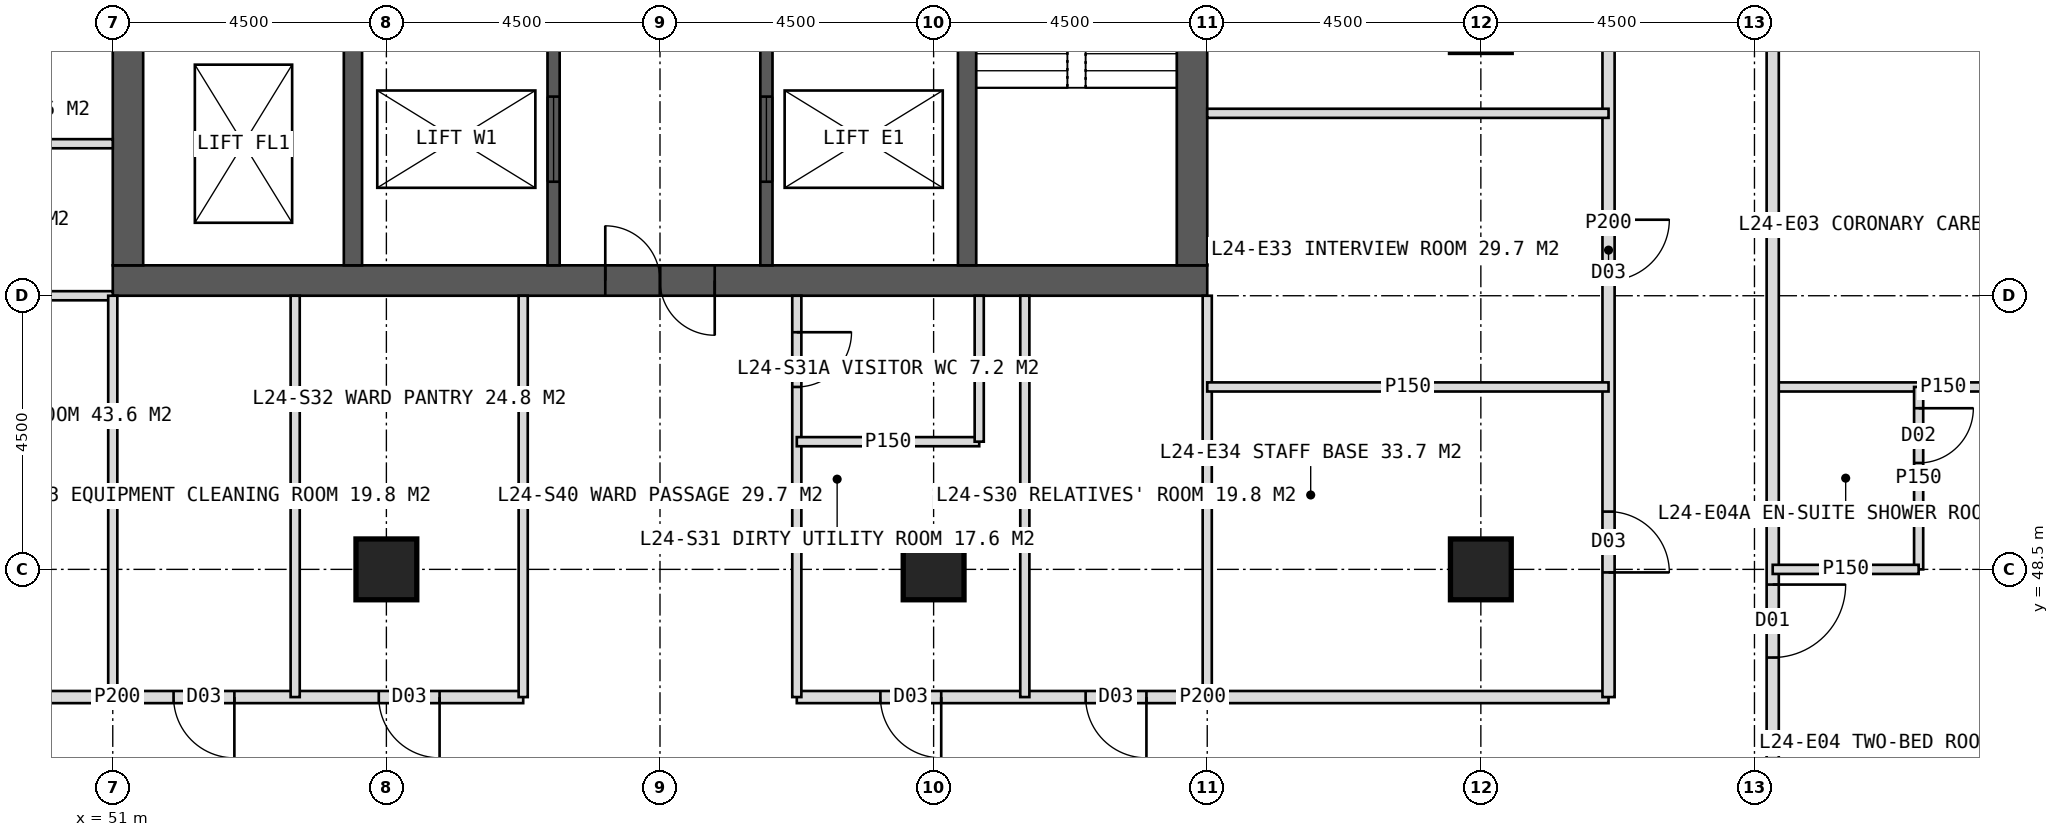
"""IFC4 building model, lengths in metres.
Left out: names, types, materials, properties, quantities, classifications, styles, units other than length and angle.
Written with IfcOpenShell. Run it as: python <this file> out.ifc"""

import sys

from ifc_helpers import new_model, si_unit, direction, frame, frame_2d, origin, origin_2d, place, context, subcontext, project, spatial, rectangle, hollow_rectangle, extrude, element, fill, save


model = new_model("IFC4")
c1 = context("Model", 3, precision=1e-05, world=origin(), true_north=direction((0.0, 1.0)))
c2 = subcontext(c1, "Body", "Model", "MODEL_VIEW")
j1 = project(units=[si_unit("LENGTHUNIT", "METRE"), si_unit("PLANEANGLEUNIT", "RADIAN")], contexts=[c1])
p1 = place(None, origin())
s1 = spatial("IfcSite", under=j1, at=p1, CompositionType="ELEMENT")
p2 = place(p1, origin())
s2 = spatial("IfcBuilding", under=s1, at=p2, CompositionType="ELEMENT")
p3 = place(p2, frame((0.0, 0.0, 104.0)))
s3 = spatial("IfcBuildingStorey", under=s2, at=p3, CompositionType="ELEMENT", Elevation=104.0)
p4 = place(p3, frame((51.0, 53.25, 0.0), z_axis=(0.0, 0.0, 1.0), x_axis=(1.0, 0.0, 0.0)))
e1 = element("IfcWall", 1, at=p4, inside=s3, PredefinedType="SHEAR", context=c2, shape_type="SweptSolid", body=[
    extrude(rectangle(XDim=18.0, YDim=0.5, at=frame_2d((9.0, 0.0))), origin(), (0.0, 0.0, 1.0), 4.0),
])
p5 = place(p4, frame((8.1, 0.0, 0.0)))
e2 = element("IfcOpeningElement", 2, at=p5, cuts=e1, PredefinedType="OPENING", context=c2, shape_type="SweptSolid", body=[
    extrude(rectangle(XDim=1.8, YDim=2.2, at=frame_2d((0.9, 1.1))), frame((0.0, 0.26, 0.0), z_axis=(0.0, -1.0, 0.0), x_axis=(1.0, 0.0, 0.0)), (0.0, 0.0, 1.0), 0.52),
])
p6 = place(p3, frame((51.25, 53.5, 0.0), z_axis=(0.0, 0.0, 1.0), x_axis=(0.0, 1.0, 0.0)))
e3 = element("IfcWall", 3, at=p6, inside=s3, PredefinedType="SHEAR", context=c2, shape_type="SweptSolid", body=[
    extrude(rectangle(XDim=17.0, YDim=0.5, at=frame_2d((8.5, 0.0))), origin(), (0.0, 0.0, 1.0), 4.0),
])
p7 = place(p6, frame((6.0, 0.0, 0.0)))
e4 = element("IfcOpeningElement", 4, at=p7, cuts=e3, PredefinedType="OPENING", context=c2, shape_type="SweptSolid", body=[
    extrude(rectangle(XDim=1.5, YDim=2.2, at=frame_2d((0.75, 1.1))), frame((0.0, 0.26, 0.0), z_axis=(0.0, -1.0, 0.0), x_axis=(1.0, 0.0, 0.0)), (0.0, 0.0, 1.0), 0.52),
])
p8 = place(p3, frame((68.75, 53.5, 0.0), z_axis=(0.0, 0.0, 1.0), x_axis=(0.0, 1.0, 0.0)))
e5 = element("IfcWall", 5, at=p8, inside=s3, PredefinedType="SHEAR", context=c2, shape_type="SweptSolid", body=[
    extrude(rectangle(XDim=17.0, YDim=0.5, at=frame_2d((8.5, 0.0))), origin(), (0.0, 0.0, 1.0), 4.0),
])
p9 = place(p8, frame((9.5, 0.0, 0.0)))
e6 = element("IfcOpeningElement", 6, at=p9, cuts=e5, PredefinedType="OPENING", context=c2, shape_type="SweptSolid", body=[
    extrude(rectangle(XDim=1.5, YDim=2.2, at=frame_2d((0.75, 1.1))), frame((0.0, 0.26, 0.0), z_axis=(0.0, -1.0, 0.0), x_axis=(1.0, 0.0, 0.0)), (0.0, 0.0, 1.0), 0.52),
])
for number, where, z_axis, x_axis in (
    (7, (54.95, 53.5, 0.0), (0.0, 0.0, 1.0), (0.0, 1.0, 0.0)),
    (8, (65.05, 53.5, 0.0), (0.0, 0.0, 1.0), (0.0, 1.0, 0.0)),
):
    element("IfcWall", number, at=place(p3, frame(where, z_axis=z_axis, x_axis=x_axis)), inside=s3, PredefinedType="SHEAR", context=c2, shape_type="SweptSolid", body=[
        extrude(rectangle(XDim=17.0, YDim=0.3, at=frame_2d((8.5, 0.0))), origin(), (0.0, 0.0, 1.0), 4.0),
    ])
p10 = place(p3, frame((58.25, 53.5, 0.0), z_axis=(0.0, 0.0, 1.0), x_axis=(0.0, 1.0, 0.0)))
e9 = element("IfcWall", 9, at=p10, inside=s3, PredefinedType="SHEAR", context=c2, shape_type="SweptSolid", body=[
    extrude(rectangle(XDim=17.0, YDim=0.2, at=frame_2d((8.5, 0.0))), origin(), (0.0, 0.0, 1.0), 4.0),
])
p11 = place(p10, frame((1.375, 0.0, 0.0)))
e10 = element("IfcOpeningElement", 10, at=p11, cuts=e9, PredefinedType="OPENING", context=c2, shape_type="SweptSolid", body=[
    extrude(rectangle(XDim=1.4, YDim=2.2, at=frame_2d((0.7, 1.1))), frame((0.0, 0.11, 0.0), z_axis=(0.0, -1.0, 0.0), x_axis=(1.0, 0.0, 0.0)), (0.0, 0.0, 1.0), 0.22),
])
p12 = place(p10, frame((5.675, 0.0, 0.0)))
e11 = element("IfcOpeningElement", 11, at=p12, cuts=e9, PredefinedType="OPENING", context=c2, shape_type="SweptSolid", body=[
    extrude(rectangle(XDim=1.4, YDim=2.2, at=frame_2d((0.7, 1.1))), frame((0.0, 0.11, 0.0), z_axis=(0.0, -1.0, 0.0), x_axis=(1.0, 0.0, 0.0)), (0.0, 0.0, 1.0), 0.22),
])
p13 = place(p3, frame((61.75, 53.5, 0.0), z_axis=(0.0, 0.0, 1.0), x_axis=(0.0, 1.0, 0.0)))
e12 = element("IfcWall", 12, at=p13, inside=s3, PredefinedType="SHEAR", context=c2, shape_type="SweptSolid", body=[
    extrude(rectangle(XDim=17.0, YDim=0.2, at=frame_2d((8.5, 0.0))), origin(), (0.0, 0.0, 1.0), 4.0),
])
p14 = place(p13, frame((1.375, 0.0, 0.0)))
e13 = element("IfcOpeningElement", 13, at=p14, cuts=e12, PredefinedType="OPENING", context=c2, shape_type="SweptSolid", body=[
    extrude(rectangle(XDim=1.4, YDim=2.2, at=frame_2d((0.7, 1.1))), frame((0.0, 0.11, 0.0), z_axis=(0.0, -1.0, 0.0), x_axis=(1.0, 0.0, 0.0)), (0.0, 0.0, 1.0), 0.22),
])
p15 = place(p13, frame((5.675, 0.0, 0.0)))
e14 = element("IfcOpeningElement", 14, at=p15, cuts=e12, PredefinedType="OPENING", context=c2, shape_type="SweptSolid", body=[
    extrude(rectangle(XDim=1.4, YDim=2.2, at=frame_2d((0.7, 1.1))), frame((0.0, 0.11, 0.0), z_axis=(0.0, -1.0, 0.0), x_axis=(1.0, 0.0, 0.0)), (0.0, 0.0, 1.0), 0.22),
])
for number, where, z_axis, x_axis in (
    (15, (73.5, 48.5, 0.0), (0.0, 0.0, 1.0), (1.0, 0.0, 0.0)),
    (16, (55.5, 48.5, 0.0), (0.0, 0.0, 1.0), (1.0, 0.0, 0.0)),
    (17, (64.5, 48.5, 0.0), (0.0, 0.0, 1.0), (1.0, 0.0, 0.0)),
):
    element("IfcColumn", number, at=place(p3, frame(where, z_axis=z_axis, x_axis=x_axis)), inside=s3, PredefinedType="COLUMN", context=c2, shape_type="SweptSolid", body=[
        extrude(hollow_rectangle(XDim=1.0, YDim=1.0, WallThickness=0.1, at=origin_2d()), origin(), (0.0, 0.0, 1.0), 4.0),
    ])
for number, where, z_axis, x_axis in (
    (18, (51.0, 53.0, 0.0), (0.0, 0.0, 1.0), (-1.0, 0.0, 0.0)),
    (19, (51.0, 55.5, 0.0), (0.0, 0.0, 1.0), (-1.0, 0.0, 0.0)),
    (20, (69.0, 53.0, 0.0), (0.0, 0.0, 1.0), (0.0, -1.0, 0.0)),
):
    element("IfcWall", number, at=place(p3, frame(where, z_axis=z_axis, x_axis=x_axis)), inside=s3, PredefinedType="PARTITIONING", context=c2, shape_type="SweptSolid", body=[
        extrude(rectangle(XDim=6.6, YDim=0.15, at=frame_2d((3.3, 0.0))), origin(), (0.0, 0.0, 1.0), 3.75),
    ])
p16 = place(p3, frame((75.6, 46.4, 0.0), z_axis=(0.0, 0.0, 1.0), x_axis=(-1.0, 0.0, 0.0)))
e21 = element("IfcWall", 21, at=p16, inside=s3, PredefinedType="PARTITIONING", context=c2, shape_type="SweptSolid", body=[
    extrude(rectangle(XDim=13.35, YDim=0.2, at=frame_2d((6.675, 0.0))), origin(), (0.0, 0.0, 1.0), 3.75),
])
p17 = place(p16, frame((7.6, 0.0, 0.0)))
e22 = element("IfcOpeningElement", 22, at=p17, cuts=e21, PredefinedType="OPENING", context=c2, shape_type="SweptSolid", body=[
    extrude(rectangle(XDim=1.0, YDim=2.1, at=frame_2d((0.5, 1.05))), frame((0.0, 0.11, 0.0), z_axis=(0.0, -1.0, 0.0), x_axis=(1.0, 0.0, 0.0)), (0.0, 0.0, 1.0), 0.22),
])
p18 = place(p16, frame((10.975, 0.0, 0.0)))
e23 = element("IfcOpeningElement", 23, at=p18, cuts=e21, PredefinedType="OPENING", context=c2, shape_type="SweptSolid", body=[
    extrude(rectangle(XDim=1.0, YDim=2.1, at=frame_2d((0.5, 1.05))), frame((0.0, 0.11, 0.0), z_axis=(0.0, -1.0, 0.0), x_axis=(1.0, 0.0, 0.0)), (0.0, 0.0, 1.0), 0.22),
])
p19 = place(p3, frame((57.75, 46.4, 0.0), z_axis=(0.0, 0.0, 1.0), x_axis=(-1.0, 0.0, 0.0)))
e24 = element("IfcWall", 24, at=p19, inside=s3, PredefinedType="PARTITIONING", context=c2, shape_type="SweptSolid", body=[
    extrude(rectangle(XDim=13.35, YDim=0.2, at=frame_2d((6.675, 0.0))), origin(), (0.0, 0.0, 1.0), 3.75),
])
p20 = place(p19, frame((1.375, 0.0, 0.0)))
e25 = element("IfcOpeningElement", 25, at=p20, cuts=e24, PredefinedType="OPENING", context=c2, shape_type="SweptSolid", body=[
    extrude(rectangle(XDim=1.0, YDim=2.1, at=frame_2d((0.5, 1.05))), frame((0.0, 0.11, 0.0), z_axis=(0.0, -1.0, 0.0), x_axis=(1.0, 0.0, 0.0)), (0.0, 0.0, 1.0), 0.22),
])
p21 = place(p19, frame((4.75, 0.0, 0.0)))
e26 = element("IfcOpeningElement", 26, at=p21, cuts=e24, PredefinedType="OPENING", context=c2, shape_type="SweptSolid", body=[
    extrude(rectangle(XDim=1.0, YDim=2.1, at=frame_2d((0.5, 1.05))), frame((0.0, 0.11, 0.0), z_axis=(0.0, -1.0, 0.0), x_axis=(1.0, 0.0, 0.0)), (0.0, 0.0, 1.0), 0.22),
])
p22 = place(p19, frame((9.55, 0.0, 0.0)))
e27 = element("IfcOpeningElement", 27, at=p22, cuts=e24, PredefinedType="OPENING", context=c2, shape_type="SweptSolid", body=[
    extrude(rectangle(XDim=1.0, YDim=2.1, at=frame_2d((0.5, 1.05))), frame((0.0, 0.11, 0.0), z_axis=(0.0, -1.0, 0.0), x_axis=(1.0, 0.0, 0.0)), (0.0, 0.0, 1.0), 0.22),
])
p23 = place(p3, frame((62.25, 53.0, 0.0), z_axis=(0.0, 0.0, 1.0), x_axis=(0.0, -1.0, 0.0)))
e28 = element("IfcWall", 28, at=p23, inside=s3, PredefinedType="PARTITIONING", context=c2, shape_type="SweptSolid", body=[
    extrude(rectangle(XDim=6.6, YDim=0.15, at=frame_2d((3.3, 0.0))), origin(), (0.0, 0.0, 1.0), 3.75),
])
p24 = place(p23, frame((0.6, 0.0, 0.0)))
e29 = element("IfcOpeningElement", 29, at=p24, cuts=e28, PredefinedType="OPENING", context=c2, shape_type="SweptSolid", body=[
    extrude(rectangle(XDim=0.9, YDim=2.1, at=frame_2d((0.45, 1.05))), frame((0.0, 0.085, 0.0), z_axis=(0.0, -1.0, 0.0), x_axis=(1.0, 0.0, 0.0)), (0.0, 0.0, 1.0), 0.17),
])
for number, where, z_axis, x_axis in (
    (30, (57.75, 53.0, 0.0), (0.0, 0.0, 1.0), (0.0, -1.0, 0.0)),
    (31, (66.0, 53.0, 0.0), (0.0, 0.0, 1.0), (0.0, -1.0, 0.0)),
    (32, (54.0, 53.0, 0.0), (0.0, 0.0, 1.0), (0.0, -1.0, 0.0)),
    (33, (51.0, 53.0, 0.0), (0.0, 0.0, 1.0), (0.0, -1.0, 0.0)),
):
    element("IfcWall", number, at=place(p3, frame(where, z_axis=z_axis, x_axis=x_axis)), inside=s3, PredefinedType="PARTITIONING", context=c2, shape_type="SweptSolid", body=[
        extrude(rectangle(XDim=6.6, YDim=0.15, at=frame_2d((3.3, 0.0))), origin(), (0.0, 0.0, 1.0), 3.75),
    ])
p25 = place(p3, frame((65.25, 50.6, 0.0), z_axis=(0.0, 0.0, 1.0), x_axis=(-1.0, 0.0, 0.0)))
e34 = element("IfcWall", 34, at=p25, inside=s3, PredefinedType="PARTITIONING", context=c2, shape_type="SweptSolid", body=[
    extrude(rectangle(XDim=3.0, YDim=0.15, at=frame_2d((1.5, 0.0))), origin(), (0.0, 0.0, 1.0), 3.75),
])
p26 = place(p3, frame((65.25, 53.0, 0.0), z_axis=(0.0, 0.0, 1.0), x_axis=(0.0, -1.0, 0.0)))
e35 = element("IfcWall", 35, at=p26, inside=s3, PredefinedType="PARTITIONING", context=c2, shape_type="SweptSolid", body=[
    extrude(rectangle(XDim=2.4, YDim=0.15, at=frame_2d((1.2, 0.0))), origin(), (0.0, 0.0, 1.0), 3.75),
])
p27 = place(p3, frame((78.3, 51.5, 0.0), z_axis=(0.0, 0.0, 1.0), x_axis=(1.0, 0.0, 0.0)))
e36 = element("IfcWall", 36, at=p27, inside=s3, PredefinedType="PARTITIONING", context=c2, shape_type="SweptSolid", body=[
    extrude(rectangle(XDim=5.61, YDim=0.15, at=frame_2d((2.805, 0.0))), origin(), (0.0, 0.0, 1.0), 3.75),
])
p28 = place(p3, frame((78.3, 80.3, 0.0), z_axis=(0.0, 0.0, 1.0), x_axis=(0.0, -1.0, 0.0)))
e37 = element("IfcWall", 37, at=p28, inside=s3, PredefinedType="PARTITIONING", context=c2, shape_type="SweptSolid", body=[
    extrude(rectangle(XDim=36.6, YDim=0.2, at=frame_2d((18.3, 0.0))), origin(), (0.0, 0.0, 1.0), 3.75),
])
p29 = place(p28, frame((3.25, 0.0, 0.0)))
e38 = element("IfcOpeningElement", 38, at=p29, cuts=e37, PredefinedType="OPENING", context=c2, shape_type="SweptSolid", body=[
    extrude(rectangle(XDim=1.2, YDim=2.2, at=frame_2d((0.6, 1.1))), frame((0.0, 0.11, 0.0), z_axis=(0.0, -1.0, 0.0), x_axis=(1.0, 0.0, 0.0)), (0.0, 0.0, 1.0), 0.22),
])
p30 = place(p28, frame((11.05, 0.0, 0.0)))
e39 = element("IfcOpeningElement", 39, at=p30, cuts=e37, PredefinedType="OPENING", context=c2, shape_type="SweptSolid", body=[
    extrude(rectangle(XDim=1.2, YDim=2.2, at=frame_2d((0.6, 1.1))), frame((0.0, 0.11, 0.0), z_axis=(0.0, -1.0, 0.0), x_axis=(1.0, 0.0, 0.0)), (0.0, 0.0, 1.0), 0.22),
])
p31 = place(p28, frame((21.55, 0.0, 0.0)))
e40 = element("IfcOpeningElement", 40, at=p31, cuts=e37, PredefinedType="OPENING", context=c2, shape_type="SweptSolid", body=[
    extrude(rectangle(XDim=1.2, YDim=2.2, at=frame_2d((0.6, 1.1))), frame((0.0, 0.11, 0.0), z_axis=(0.0, -1.0, 0.0), x_axis=(1.0, 0.0, 0.0)), (0.0, 0.0, 1.0), 0.22),
])
p32 = place(p28, frame((32.05, 0.0, 0.0)))
e41 = element("IfcOpeningElement", 41, at=p32, cuts=e37, PredefinedType="OPENING", context=c2, shape_type="SweptSolid", body=[
    extrude(rectangle(XDim=1.2, YDim=2.2, at=frame_2d((0.6, 1.1))), frame((0.0, 0.11, 0.0), z_axis=(0.0, -1.0, 0.0), x_axis=(1.0, 0.0, 0.0)), (0.0, 0.0, 1.0), 0.22),
])
p33 = place(p3, frame((80.7, 51.5, 0.0), z_axis=(0.0, 0.0, 1.0), x_axis=(0.0, -1.0, 0.0)))
e42 = element("IfcWall", 42, at=p33, inside=s3, PredefinedType="PARTITIONING", context=c2, shape_type="SweptSolid", body=[
    extrude(rectangle(XDim=3.0, YDim=0.15, at=frame_2d((1.5, 0.0))), origin(), (0.0, 0.0, 1.0), 3.75),
])
p34 = place(p33, frame((0.35, 0.0, 0.0)))
e43 = element("IfcOpeningElement", 43, at=p34, cuts=e42, PredefinedType="OPENING", context=c2, shape_type="SweptSolid", body=[
    extrude(rectangle(XDim=0.9, YDim=2.1, at=frame_2d((0.45, 1.05))), frame((0.0, 0.085, 0.0), z_axis=(0.0, -1.0, 0.0), x_axis=(1.0, 0.0, 0.0)), (0.0, 0.0, 1.0), 0.17),
])
p35 = place(p3, frame((78.3, 48.5, 0.0), z_axis=(0.0, 0.0, 1.0), x_axis=(1.0, 0.0, 0.0)))
e44 = element("IfcWall", 44, at=p35, inside=s3, PredefinedType="PARTITIONING", context=c2, shape_type="SweptSolid", body=[
    extrude(rectangle(XDim=2.4, YDim=0.15, at=frame_2d((1.2, 0.0))), origin(), (0.0, 0.0, 1.0), 2.95),
])
p36 = place(p3, frame((75.6, 62.0, 0.0), z_axis=(0.0, 0.0, 1.0), x_axis=(0.0, -1.0, 0.0)))
e45 = element("IfcWall", 45, at=p36, inside=s3, PredefinedType="PARTITIONING", context=c2, shape_type="SweptSolid", body=[
    extrude(rectangle(XDim=15.6, YDim=0.2, at=frame_2d((7.8, 0.0))), origin(), (0.0, 0.0, 1.0), 3.75),
])
p37 = place(p36, frame((2.5, 0.0, 0.0)))
e46 = element("IfcOpeningElement", 46, at=p37, cuts=e45, PredefinedType="OPENING", context=c2, shape_type="SweptSolid", body=[
    extrude(rectangle(XDim=1.0, YDim=2.1, at=frame_2d((0.5, 1.05))), frame((0.0, 0.11, 0.0), z_axis=(0.0, -1.0, 0.0), x_axis=(1.0, 0.0, 0.0)), (0.0, 0.0, 1.0), 0.22),
])
p38 = place(p36, frame((7.75, 0.0, 0.0)))
e47 = element("IfcOpeningElement", 47, at=p38, cuts=e45, PredefinedType="OPENING", context=c2, shape_type="SweptSolid", body=[
    extrude(rectangle(XDim=1.0, YDim=2.1, at=frame_2d((0.5, 1.05))), frame((0.0, 0.11, 0.0), z_axis=(0.0, -1.0, 0.0), x_axis=(1.0, 0.0, 0.0)), (0.0, 0.0, 1.0), 0.22),
])
p39 = place(p36, frame((12.55, 0.0, 0.0)))
e48 = element("IfcOpeningElement", 48, at=p39, cuts=e45, PredefinedType="OPENING", context=c2, shape_type="SweptSolid", body=[
    extrude(rectangle(XDim=1.0, YDim=2.1, at=frame_2d((0.5, 1.05))), frame((0.0, 0.11, 0.0), z_axis=(0.0, -1.0, 0.0), x_axis=(1.0, 0.0, 0.0)), (0.0, 0.0, 1.0), 0.22),
])
for number, where, z_axis, x_axis in (
    (49, (69.0, 56.0, 0.0), (0.0, 0.0, 1.0), (1.0, 0.0, 0.0)),
    (50, (69.0, 51.5, 0.0), (0.0, 0.0, 1.0), (1.0, 0.0, 0.0)),
):
    element("IfcWall", number, at=place(p3, frame(where, z_axis=z_axis, x_axis=x_axis)), inside=s3, PredefinedType="PARTITIONING", context=c2, shape_type="SweptSolid", body=[
        extrude(rectangle(XDim=6.6, YDim=0.15, at=frame_2d((3.3, 0.0))), origin(), (0.0, 0.0, 1.0), 3.75),
    ])
p40 = place(p17, origin())
e51 = element("IfcDoor", 51, at=p40, inside=s3, OperationType="SINGLE_SWING_LEFT", PredefinedType="DOOR", context=c2, shape_type="SweptSolid", body=[
    extrude(rectangle(XDim=1.0, YDim=2.1, at=frame_2d((0.5, 1.05))), frame((0.0, 0.025, 0.0), z_axis=(0.0, -1.0, 0.0), x_axis=(1.0, 0.0, 0.0)), (0.0, 0.0, 1.0), 0.05),
])
fill(e22, e51)
p41 = place(p24, origin())
e52 = element("IfcDoor", 52, at=p41, inside=s3, OperationType="SINGLE_SWING_LEFT", PredefinedType="DOOR", context=c2, shape_type="SweptSolid", body=[
    extrude(rectangle(XDim=0.9, YDim=2.1, at=frame_2d((0.45, 1.05))), frame((0.0, 0.025, 0.0), z_axis=(0.0, -1.0, 0.0), x_axis=(1.0, 0.0, 0.0)), (0.0, 0.0, 1.0), 0.05),
])
fill(e29, e52)
p42 = place(p18, origin())
e53 = element("IfcDoor", 53, at=p42, inside=s3, OperationType="SINGLE_SWING_LEFT", PredefinedType="DOOR", context=c2, shape_type="SweptSolid", body=[
    extrude(rectangle(XDim=1.0, YDim=2.1, at=frame_2d((0.5, 1.05))), frame((0.0, 0.025, 0.0), z_axis=(0.0, -1.0, 0.0), x_axis=(1.0, 0.0, 0.0)), (0.0, 0.0, 1.0), 0.05),
])
fill(e23, e53)
p43 = place(p20, origin())
e54 = element("IfcDoor", 54, at=p43, inside=s3, OperationType="SINGLE_SWING_LEFT", PredefinedType="DOOR", context=c2, shape_type="SweptSolid", body=[
    extrude(rectangle(XDim=1.0, YDim=2.1, at=frame_2d((0.5, 1.05))), frame((0.0, 0.025, 0.0), z_axis=(0.0, -1.0, 0.0), x_axis=(1.0, 0.0, 0.0)), (0.0, 0.0, 1.0), 0.05),
])
fill(e25, e54)
p44 = place(p21, origin())
e55 = element("IfcDoor", 55, at=p44, inside=s3, OperationType="SINGLE_SWING_LEFT", PredefinedType="DOOR", context=c2, shape_type="SweptSolid", body=[
    extrude(rectangle(XDim=1.0, YDim=2.1, at=frame_2d((0.5, 1.05))), frame((0.0, 0.025, 0.0), z_axis=(0.0, -1.0, 0.0), x_axis=(1.0, 0.0, 0.0)), (0.0, 0.0, 1.0), 0.05),
])
fill(e26, e55)
p45 = place(p32, origin())
e56 = element("IfcDoor", 56, at=p45, inside=s3, OperationType="SINGLE_SWING_LEFT", PredefinedType="DOOR", context=c2, shape_type="SweptSolid", body=[
    extrude(rectangle(XDim=1.2, YDim=2.2, at=frame_2d((0.6, 1.1))), frame((0.0, 0.025, 0.0), z_axis=(0.0, -1.0, 0.0), x_axis=(1.0, 0.0, 0.0)), (0.0, 0.0, 1.0), 0.05),
])
fill(e41, e56)
p46 = place(p34, origin())
e57 = element("IfcDoor", 57, at=p46, inside=s3, OperationType="SINGLE_SWING_LEFT", PredefinedType="DOOR", context=c2, shape_type="SweptSolid", body=[
    extrude(rectangle(XDim=0.9, YDim=2.1, at=frame_2d((0.45, 1.05))), frame((0.0, 0.025, 0.0), z_axis=(0.0, -1.0, 0.0), x_axis=(1.0, 0.0, 0.0)), (0.0, 0.0, 1.0), 0.05),
])
fill(e43, e57)
p47 = place(p38, origin())
e58 = element("IfcDoor", 58, at=p47, inside=s3, OperationType="SINGLE_SWING_LEFT", PredefinedType="DOOR", context=c2, shape_type="SweptSolid", body=[
    extrude(rectangle(XDim=1.0, YDim=2.1, at=frame_2d((0.5, 1.05))), frame((0.0, 0.025, 0.0), z_axis=(0.0, -1.0, 0.0), x_axis=(1.0, 0.0, 0.0)), (0.0, 0.0, 1.0), 0.05),
])
fill(e47, e58)
p48 = place(p39, origin())
e59 = element("IfcDoor", 59, at=p48, inside=s3, OperationType="SINGLE_SWING_RIGHT", PredefinedType="DOOR", context=c2, shape_type="SweptSolid", body=[
    extrude(rectangle(XDim=1.0, YDim=2.1, at=frame_2d((0.5, 1.05))), frame((0.0, 0.025, 0.0), z_axis=(0.0, -1.0, 0.0), x_axis=(1.0, 0.0, 0.0)), (0.0, 0.0, 1.0), 0.05),
])
fill(e48, e59)
p49 = place(p5, origin())
e60 = element("IfcDoor", 60, at=p49, inside=s3, OperationType="DOUBLE_DOOR_SINGLE_SWING", PredefinedType="DOOR", context=c2, shape_type="SweptSolid", body=[
    extrude(rectangle(XDim=1.8, YDim=2.2, at=frame_2d((0.9, 1.1))), frame((0.0, 0.025, 0.0), z_axis=(0.0, -1.0, 0.0), x_axis=(1.0, 0.0, 0.0)), (0.0, 0.0, 1.0), 0.05),
])
fill(e2, e60)
p50 = place(p11, origin())
e61 = element("IfcDoor", 61, at=p50, inside=s3, OperationType="SLIDING_TO_LEFT", PredefinedType="DOOR", context=c2, shape_type="SweptSolid", body=[
    extrude(rectangle(XDim=1.4, YDim=2.2, at=frame_2d((0.7, 1.1))), frame((0.0, 0.025, 0.0), z_axis=(0.0, -1.0, 0.0), x_axis=(1.0, 0.0, 0.0)), (0.0, 0.0, 1.0), 0.05),
])
fill(e10, e61)
p51 = place(p14, origin())
e62 = element("IfcDoor", 62, at=p51, inside=s3, OperationType="SLIDING_TO_LEFT", PredefinedType="DOOR", context=c2, shape_type="SweptSolid", body=[
    extrude(rectangle(XDim=1.4, YDim=2.2, at=frame_2d((0.7, 1.1))), frame((0.0, 0.025, 0.0), z_axis=(0.0, -1.0, 0.0), x_axis=(1.0, 0.0, 0.0)), (0.0, 0.0, 1.0), 0.05),
])
fill(e13, e62)
save(model, sys.argv[1])
